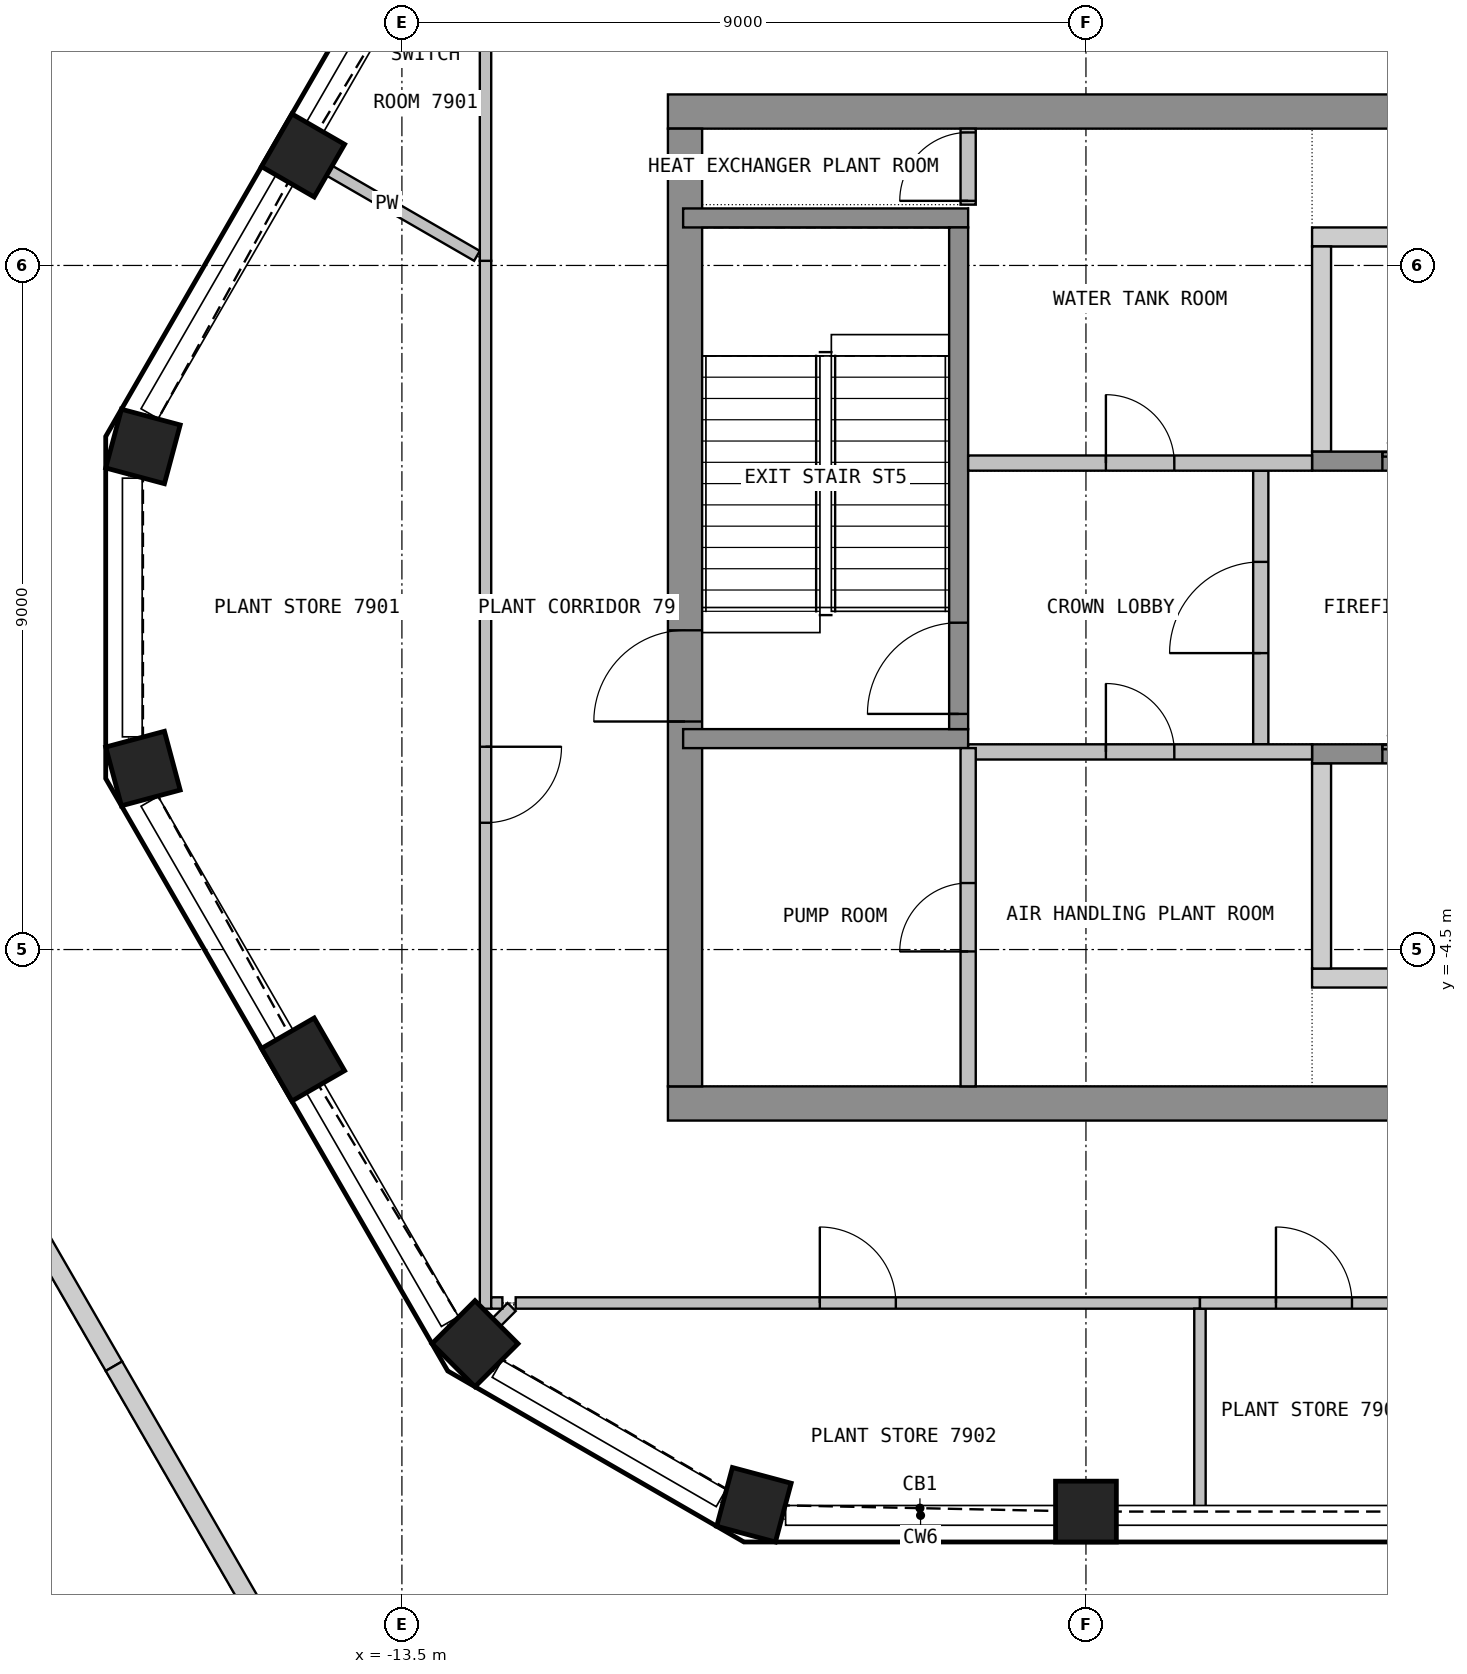
"""IFC4 building model, lengths in metres.
Left out: names, types, materials, properties, quantities, classifications, styles, units other than length and angle.
Written with IfcOpenShell. Run it as: python <this file> out.ifc"""

import sys

from ifc_helpers import new_model, si_unit, direction, frame, frame_2d, origin, origin_2d, place, context, subcontext, project, spatial, polyline, rectangle, outline, extrude, element, fill, save


model = new_model("IFC4")
c1 = context("Model", 3, precision=1e-05, world=origin(), true_north=direction((0.0, 1.0)))
c2 = subcontext(c1, "Body", "Model", "MODEL_VIEW")
j1 = project(units=[si_unit("LENGTHUNIT", "METRE"), si_unit("PLANEANGLEUNIT", "RADIAN")], contexts=[c1])
p1 = place(None, origin())
s1 = spatial("IfcSite", under=j1, at=p1, CompositionType="ELEMENT")
p2 = place(p1, origin())
s2 = spatial("IfcBuilding", under=s1, at=p2, CompositionType="ELEMENT")
p3 = place(p2, frame((0.0, 0.0, 323.4)))
s3 = spatial("IfcBuildingStorey", under=s2, at=p3, CompositionType="ELEMENT", Elevation=323.4)
for number, where, z_axis, x_axis in (
    (1, (-8.869, -11.804, 0.0), (0.0, 0.0, 1.0), (0.966, -0.259, 0.0)),
    (2, (-4.5, -11.894, 0.0), (0.0, 0.0, 1.0), (1.0, 0.0, 0.0)),
    (3, (-14.801, 5.947, 0.0), (0.0, 0.0, 1.0), (-0.5, -0.866, 0.0)),
    (4, (-16.907, 2.119, 0.0), (0.0, 0.0, 1.0), (-0.259, -0.966, 0.0)),
    (5, (-16.907, -2.119, 0.0), (0.0, 0.0, 1.0), (0.259, -0.966, 0.0)),
    (6, (-14.801, -5.947, 0.0), (0.0, 0.0, 1.0), (0.5, -0.866, 0.0)),
    (7, (-12.539, -9.686, 0.0), (0.0, 0.0, 1.0), (0.707, -0.707, 0.0)),
):
    element("IfcColumn", number, at=place(p3, frame(where, z_axis=z_axis, x_axis=x_axis)), inside=s3, PredefinedType="COLUMN", context=c2, shape_type="SweptSolid", body=[
        extrude(rectangle(XDim=0.8, YDim=0.8, at=origin_2d()), origin(), (0.0, 0.0, 1.0), 4.05),
    ])
p4 = place(p3, origin())
e8 = element("IfcWall", 8, at=p4, inside=s3, PredefinedType="PARAPET", context=c2, shape_type="SweptSolid", body=[
    extrude(outline(polyline([(-17.397, 10.044), (-19.647, 6.147), (-19.431, 6.022), (-17.181, 9.919), (-17.397, 10.044)])), origin(), (0.0, 0.0, 1.0), 1.1),
])
p5 = place(p3, origin())
e9 = element("IfcWall", 9, at=p5, inside=s3, PredefinedType="PARAPET", context=c2, shape_type="SweptSolid", body=[
    extrude(outline(polyline([(-19.647, -6.147), (-17.397, -10.044), (-17.181, -9.919), (-19.431, -6.022), (-19.647, -6.147)])), origin(), (0.0, 0.0, 1.0), 1.1),
])
p6 = place(p3, origin())
e10 = element("IfcWall", 10, at=p6, inside=s3, PredefinedType="PARAPET", context=c2, shape_type="SweptSolid", body=[
    extrude(outline(polyline([(-17.397, -10.044), (-15.147, -13.941), (-14.964, -13.758), (-17.181, -9.919), (-17.397, -10.044)])), origin(), (0.0, 0.0, 1.0), 1.1),
])
for number, where, z_axis, x_axis in (
    (11, (-10.0, 6.525, 0.0), (0.0, 0.0, 1.0), (1.0, 0.0, 0.0)),
    (12, (-10.0, -6.525, 0.0), (0.0, 0.0, 1.0), (1.0, 0.0, 0.0)),
):
    element("IfcWall", number, at=place(p3, frame(where, z_axis=z_axis, x_axis=x_axis)), inside=s3, PredefinedType="SHEAR", context=c2, shape_type="SweptSolid", body=[
        extrude(rectangle(XDim=20.0, YDim=0.45, at=frame_2d((10.0, 0.0))), origin(), (0.0, 0.0, 1.0), 4.05),
    ])
p7 = place(p3, frame((-9.775, -6.3, 0.0), z_axis=(0.0, 0.0, 1.0), x_axis=(0.0, 1.0, 0.0)))
e13 = element("IfcWall", 13, at=p7, inside=s3, PredefinedType="SHEAR", context=c2, shape_type="SweptSolid", body=[
    extrude(rectangle(XDim=12.6, YDim=0.45, at=frame_2d((6.3, 0.0))), origin(), (0.0, 0.0, 1.0), 4.05),
])
p8 = place(p7, frame((4.8, 0.0, 0.0)))
e14 = element("IfcOpeningElement", 14, at=p8, cuts=e13, PredefinedType="OPENING", context=c2, shape_type="SweptSolid", body=[
    extrude(rectangle(XDim=1.2, YDim=2.1, at=frame_2d((0.6, 1.05))), frame((0.0, 0.235, 0.0), z_axis=(0.0, -1.0, 0.0), x_axis=(1.0, 0.0, 0.0)), (0.0, 0.0, 1.0), 0.47),
])
p9 = place(p3, origin())
e15 = element("IfcWall", 15, at=p9, inside=s3, PredefinedType="SHEAR", context=c2, shape_type="SweptSolid", body=[
    extrude(outline(polyline([(-1.525, 4.75), (1.525, 4.75), (1.525, 5.0), (-1.525, 5.0), (-1.525, 4.75)])), origin(), (0.0, 0.0, 1.0), 4.05),
])
p10 = place(p3, origin())
e16 = element("IfcWall", 16, at=p10, inside=s3, PredefinedType="SHEAR", context=c2, shape_type="SweptSolid", body=[
    extrude(outline(polyline([(-1.525, 2.05), (-1.275, 2.05), (-1.275, 4.75), (-1.525, 4.75), (-1.525, 2.05)])), origin(), (0.0, 0.0, 1.0), 4.05),
])
p11 = place(p3, frame((-1.525, 1.925, 0.0), z_axis=(0.0, 0.0, 1.0), x_axis=(1.0, 0.0, 0.0)))
e17 = element("IfcWall", 17, at=p11, inside=s3, PredefinedType="SHEAR", context=c2, shape_type="SweptSolid", body=[
    extrude(rectangle(XDim=3.05, YDim=0.25, at=frame_2d((1.525, 0.0))), origin(), (0.0, 0.0, 1.0), 4.05),
])
p12 = place(p11, frame((0.925, 0.0, 0.0)))
e18 = element("IfcOpeningElement", 18, at=p12, cuts=e17, PredefinedType="OPENING", context=c2, shape_type="SweptSolid", body=[
    extrude(rectangle(XDim=1.2, YDim=2.1, at=frame_2d((0.6, 1.05))), frame((0.0, 0.135, 0.0), z_axis=(0.0, -1.0, 0.0), x_axis=(1.0, 0.0, 0.0)), (0.0, 0.0, 1.0), 0.27),
])
p13 = place(p3, origin())
e19 = element("IfcWall", 19, at=p13, inside=s3, PredefinedType="SHEAR", context=c2, shape_type="SweptSolid", body=[
    extrude(outline(polyline([(-1.525, -5.0), (1.525, -5.0), (1.525, -4.75), (-1.525, -4.75), (-1.525, -5.0)])), origin(), (0.0, 0.0, 1.0), 4.05),
])
p14 = place(p3, origin())
e20 = element("IfcWall", 20, at=p14, inside=s3, PredefinedType="SHEAR", context=c2, shape_type="SweptSolid", body=[
    extrude(outline(polyline([(-1.525, -4.75), (-1.275, -4.75), (-1.275, -2.05), (-1.525, -2.05), (-1.525, -4.75)])), origin(), (0.0, 0.0, 1.0), 4.05),
])
p15 = place(p3, frame((-1.525, -1.925, 0.0), z_axis=(0.0, 0.0, 1.0), x_axis=(1.0, 0.0, 0.0)))
e21 = element("IfcWall", 21, at=p15, inside=s3, PredefinedType="SHEAR", context=c2, shape_type="SweptSolid", body=[
    extrude(rectangle(XDim=3.05, YDim=0.25, at=frame_2d((1.525, 0.0))), origin(), (0.0, 0.0, 1.0), 4.05),
])
p16 = place(p15, frame((0.925, 0.0, 0.0)))
e22 = element("IfcOpeningElement", 22, at=p16, cuts=e21, PredefinedType="OPENING", context=c2, shape_type="SweptSolid", body=[
    extrude(rectangle(XDim=1.2, YDim=2.1, at=frame_2d((0.6, 1.05))), frame((0.0, 0.135, 0.0), z_axis=(0.0, -1.0, 0.0), x_axis=(1.0, 0.0, 0.0)), (0.0, 0.0, 1.0), 0.27),
])
p17 = place(p3, frame((-2.2, -1.8, 0.0), z_axis=(0.0, 0.0, 1.0), x_axis=(0.0, 1.0, 0.0)))
e23 = element("IfcWall", 23, at=p17, inside=s3, PredefinedType="PARTITIONING", context=c2, shape_type="SweptSolid", body=[
    extrude(rectangle(XDim=3.6, YDim=0.2, at=frame_2d((1.8, 0.0))), origin(), (0.0, 0.0, 1.0), 4.05),
])
p18 = place(p17, frame((1.2, 0.0, 0.0)))
e24 = element("IfcOpeningElement", 24, at=p18, cuts=e23, PredefinedType="OPENING", context=c2, shape_type="SweptSolid", body=[
    extrude(rectangle(XDim=1.2, YDim=2.1, at=frame_2d((0.6, 1.05))), frame((0.0, 0.11, 0.0), z_axis=(0.0, -1.0, 0.0), x_axis=(1.0, 0.0, 0.0)), (0.0, 0.0, 1.0), 0.22),
])
for number, where, z_axis, x_axis in (
    (25, (-9.8, -1.725, 0.0), (0.0, 0.0, 1.0), (1.0, 0.0, 0.0)),
    (26, (-9.8, 5.125, 0.0), (0.0, 0.0, 1.0), (1.0, 0.0, 0.0)),
):
    element("IfcWall", number, at=place(p3, frame(where, z_axis=z_axis, x_axis=x_axis)), inside=s3, PredefinedType="SHEAR", context=c2, shape_type="SweptSolid", body=[
        extrude(rectangle(XDim=3.75, YDim=0.25, at=frame_2d((1.875, 0.0))), origin(), (0.0, 0.0, 1.0), 4.05),
    ])
p19 = place(p3, frame((-6.175, -1.6, 0.0), z_axis=(0.0, 0.0, 1.0), x_axis=(0.0, 1.0, 0.0)))
e27 = element("IfcWall", 27, at=p19, inside=s3, PredefinedType="SHEAR", context=c2, shape_type="SweptSolid", body=[
    extrude(rectangle(XDim=6.6, YDim=0.25, at=frame_2d((3.3, 0.0))), origin(), (0.0, 0.0, 1.0), 4.05),
])
p20 = place(p19, frame((0.2, 0.0, 0.0)))
e28 = element("IfcOpeningElement", 28, at=p20, cuts=e27, PredefinedType="OPENING", context=c2, shape_type="SweptSolid", body=[
    extrude(rectangle(XDim=1.2, YDim=2.1, at=frame_2d((0.6, 1.05))), frame((0.0, 0.135, 0.0), z_axis=(0.0, -1.0, 0.0), x_axis=(1.0, 0.0, 0.0)), (0.0, 0.0, 1.0), 0.27),
])
p21 = place(p3, frame((-6.05, 1.9, 0.0), z_axis=(0.0, 0.0, 1.0), x_axis=(1.0, 0.0, 0.0)))
e29 = element("IfcWall", 29, at=p21, inside=s3, PredefinedType="PARTITIONING", context=c2, shape_type="SweptSolid", body=[
    extrude(rectangle(XDim=4.525, YDim=0.2, at=frame_2d((2.263, 0.0))), origin(), (0.0, 0.0, 1.0), 4.05),
])
p22 = place(p21, frame((1.812, 0.0, 0.0)))
e30 = element("IfcOpeningElement", 30, at=p22, cuts=e29, PredefinedType="OPENING", context=c2, shape_type="SweptSolid", body=[
    extrude(rectangle(XDim=0.9, YDim=2.1, at=frame_2d((0.45, 1.05))), frame((0.0, 0.11, 0.0), z_axis=(0.0, -1.0, 0.0), x_axis=(1.0, 0.0, 0.0)), (0.0, 0.0, 1.0), 0.22),
])
p23 = place(p3, frame((-6.05, -1.9, 0.0), z_axis=(0.0, 0.0, 1.0), x_axis=(1.0, 0.0, 0.0)))
e31 = element("IfcWall", 31, at=p23, inside=s3, PredefinedType="PARTITIONING", context=c2, shape_type="SweptSolid", body=[
    extrude(rectangle(XDim=4.525, YDim=0.2, at=frame_2d((2.263, 0.0))), origin(), (0.0, 0.0, 1.0), 4.05),
])
p24 = place(p23, frame((1.812, 0.0, 0.0)))
e32 = element("IfcOpeningElement", 32, at=p24, cuts=e31, PredefinedType="OPENING", context=c2, shape_type="SweptSolid", body=[
    extrude(rectangle(XDim=0.9, YDim=2.1, at=frame_2d((0.45, 1.05))), frame((0.0, 0.11, 0.0), z_axis=(0.0, -1.0, 0.0), x_axis=(1.0, 0.0, 0.0)), (0.0, 0.0, 1.0), 0.22),
])
p25 = place(p3, frame((-6.05, 5.3, 0.0), z_axis=(0.0, 0.0, 1.0), x_axis=(0.0, 1.0, 0.0)))
e33 = element("IfcWall", 33, at=p25, inside=s3, PredefinedType="PARTITIONING", context=c2, shape_type="SweptSolid", body=[
    extrude(rectangle(XDim=1.0, YDim=0.2, at=frame_2d((0.5, 0.0))), origin(), (0.0, 0.0, 1.0), 4.05),
])
p26 = place(p25, frame((0.05, 0.0, 0.0)))
e34 = element("IfcOpeningElement", 34, at=p26, cuts=e33, PredefinedType="OPENING", context=c2, shape_type="SweptSolid", body=[
    extrude(rectangle(XDim=0.9, YDim=2.1, at=frame_2d((0.45, 1.05))), frame((0.0, 0.11, 0.0), z_axis=(0.0, -1.0, 0.0), x_axis=(1.0, 0.0, 0.0)), (0.0, 0.0, 1.0), 0.22),
])
p27 = place(p3, frame((-6.05, -6.3, 0.0), z_axis=(0.0, 0.0, 1.0), x_axis=(0.0, 1.0, 0.0)))
e35 = element("IfcWall", 35, at=p27, inside=s3, PredefinedType="PARTITIONING", context=c2, shape_type="SweptSolid", body=[
    extrude(rectangle(XDim=4.45, YDim=0.2, at=frame_2d((2.225, 0.0))), origin(), (0.0, 0.0, 1.0), 4.05),
])
p28 = place(p27, frame((1.775, 0.0, 0.0)))
e36 = element("IfcOpeningElement", 36, at=p28, cuts=e35, PredefinedType="OPENING", context=c2, shape_type="SweptSolid", body=[
    extrude(rectangle(XDim=0.9, YDim=2.1, at=frame_2d((0.45, 1.05))), frame((0.0, 0.11, 0.0), z_axis=(0.0, -1.0, 0.0), x_axis=(1.0, 0.0, 0.0)), (0.0, 0.0, 1.0), 0.22),
])
p29 = place(p3, frame((-14.887, 5.997, 0.0), z_axis=(0.0, 0.0, 1.0), x_axis=(0.865976483427, -0.500084722974, 0.0)))
e37 = element("IfcWall", 37, at=p29, inside=s3, PredefinedType="PARTITIONING", context=c2, shape_type="SweptSolid", body=[
    extrude(rectangle(XDim=2.742, YDim=0.15, at=frame_2d((1.371, 0.0))), origin(), (0.0, 0.0, 1.0), 4.05),
])
p30 = place(p3, frame((-12.056, -9.203, 0.0), z_axis=(0.0, 0.0, 1.0), x_axis=(-0.706689978005, -0.707523338828, 0.0)))
e38 = element("IfcWall", 38, at=p30, inside=s3, PredefinedType="PARTITIONING", context=c2, shape_type="SweptSolid", body=[
    extrude(rectangle(XDim=0.879, YDim=0.15, at=frame_2d((0.439, 0.0))), origin(), (0.0, 0.0, 1.0), 4.05),
])
p31 = place(p3, frame((-12.4, 4.561, 0.0), z_axis=(0.0, 0.0, 1.0), x_axis=(0.0, -1.0, 0.0)))
e39 = element("IfcWall", 39, at=p31, inside=s3, PredefinedType="PARTITIONING", context=c2, shape_type="SweptSolid", body=[
    extrude(rectangle(XDim=13.786, YDim=0.15, at=frame_2d((6.893, 0.0))), origin(), (0.0, 0.0, 1.0), 4.05),
])
p32 = place(p31, frame((6.393, 0.0, 0.0)))
e40 = element("IfcOpeningElement", 40, at=p32, cuts=e39, PredefinedType="OPENING", context=c2, shape_type="SweptSolid", body=[
    extrude(rectangle(XDim=1.0, YDim=2.1, at=frame_2d((0.5, 1.05))), frame((0.0, 0.085, 0.0), z_axis=(0.0, -1.0, 0.0), x_axis=(1.0, 0.0, 0.0)), (0.0, 0.0, 1.0), 0.17),
])
p33 = place(p3, frame((-12.325, -9.15, 0.0), z_axis=(0.0, 0.0, 1.0), x_axis=(1.0, 0.0, 0.0)))
e41 = element("IfcWall", 41, at=p33, inside=s3, PredefinedType="PARTITIONING", context=c2, shape_type="SweptSolid", body=[
    extrude(rectangle(XDim=0.147, YDim=0.15, at=frame_2d((0.073, 0.0))), origin(), (0.0, 0.0, 1.0), 4.05),
])
p34 = place(p3, frame((-12.4, 9.225, 0.0), z_axis=(0.0, 0.0, 1.0), x_axis=(0.0, -1.0, 0.0)))
e42 = element("IfcWall", 42, at=p34, inside=s3, PredefinedType="PARTITIONING", context=c2, shape_type="SweptSolid", body=[
    extrude(rectangle(XDim=4.664, YDim=0.15, at=frame_2d((2.332, 0.0))), origin(), (0.0, 0.0, 1.0), 4.05),
])
p35 = place(p3, frame((-12.003, -9.15, 0.0), z_axis=(0.0, 0.0, 1.0), x_axis=(1.0, 0.0, 0.0)))
e43 = element("IfcWall", 43, at=p35, inside=s3, PredefinedType="PARTITIONING", context=c2, shape_type="SweptSolid", body=[
    extrude(rectangle(XDim=9.003, YDim=0.15, at=frame_2d((4.501, 0.0))), origin(), (0.0, 0.0, 1.0), 4.05),
])
p36 = place(p35, frame((4.001, 0.0, 0.0)))
e44 = element("IfcOpeningElement", 44, at=p36, cuts=e43, PredefinedType="OPENING", context=c2, shape_type="SweptSolid", body=[
    extrude(rectangle(XDim=1.0, YDim=2.1, at=frame_2d((0.5, 1.05))), frame((0.0, 0.085, 0.0), z_axis=(0.0, -1.0, 0.0), x_axis=(1.0, 0.0, 0.0)), (0.0, 0.0, 1.0), 0.17),
])
p37 = place(p3, frame((-3.0, -9.225, 0.0), z_axis=(0.0, 0.0, 1.0), x_axis=(0.0, -1.0, 0.0)))
e45 = element("IfcWall", 45, at=p37, inside=s3, PredefinedType="PARTITIONING", context=c2, shape_type="SweptSolid", body=[
    extrude(rectangle(XDim=2.769, YDim=0.15, at=frame_2d((1.384, 0.0))), origin(), (0.0, 0.0, 1.0), 4.05),
])
p38 = place(p3, frame((-3.0, -9.15, 0.0), z_axis=(0.0, 0.0, 1.0), x_axis=(1.0, 0.0, 0.0)))
e46 = element("IfcWall", 46, at=p38, inside=s3, PredefinedType="PARTITIONING", context=c2, shape_type="SweptSolid", body=[
    extrude(rectangle(XDim=3.0, YDim=0.15, at=frame_2d((1.5, 0.0))), origin(), (0.0, 0.0, 1.0), 4.05),
])
p39 = place(p38, frame((1.0, 0.0, 0.0)))
e47 = element("IfcOpeningElement", 47, at=p39, cuts=e46, PredefinedType="OPENING", context=c2, shape_type="SweptSolid", body=[
    extrude(rectangle(XDim=1.0, YDim=2.1, at=frame_2d((0.5, 1.05))), frame((0.0, 0.085, 0.0), z_axis=(0.0, -1.0, 0.0), x_axis=(1.0, 0.0, 0.0)), (0.0, 0.0, 1.0), 0.17),
])
p40 = place(p8, origin())
e48 = element("IfcDoor", 48, at=p40, inside=s3, OperationType="SINGLE_SWING_RIGHT", PredefinedType="DOOR", context=c2, shape_type="SweptSolid", body=[
    extrude(rectangle(XDim=1.2, YDim=2.1, at=frame_2d((0.6, 1.05))), frame((0.0, 0.025, 0.0), z_axis=(0.0, -1.0, 0.0), x_axis=(1.0, 0.0, 0.0)), (0.0, 0.0, 1.0), 0.05),
])
fill(e14, e48)
p41 = place(p12, origin())
e49 = element("IfcDoor", 49, at=p41, inside=s3, OperationType="DOUBLE_DOOR_SLIDING", PredefinedType="DOOR", context=c2, shape_type="SweptSolid", body=[
    extrude(rectangle(XDim=1.2, YDim=2.1, at=frame_2d((0.6, 1.05))), frame((0.0, 0.025, 0.0), z_axis=(0.0, -1.0, 0.0), x_axis=(1.0, 0.0, 0.0)), (0.0, 0.0, 1.0), 0.05),
])
fill(e18, e49)
p42 = place(p16, origin())
e50 = element("IfcDoor", 50, at=p42, inside=s3, OperationType="DOUBLE_DOOR_SLIDING", PredefinedType="DOOR", context=c2, shape_type="SweptSolid", body=[
    extrude(rectangle(XDim=1.2, YDim=2.1, at=frame_2d((0.6, 1.05))), frame((0.0, 0.025, 0.0), z_axis=(0.0, -1.0, 0.0), x_axis=(1.0, 0.0, 0.0)), (0.0, 0.0, 1.0), 0.05),
])
fill(e22, e50)
p43 = place(p18, origin())
e51 = element("IfcDoor", 51, at=p43, inside=s3, OperationType="SINGLE_SWING_LEFT", PredefinedType="DOOR", context=c2, shape_type="SweptSolid", body=[
    extrude(rectangle(XDim=1.2, YDim=2.1, at=frame_2d((0.6, 1.05))), frame((0.0, 0.025, 0.0), z_axis=(0.0, -1.0, 0.0), x_axis=(1.0, 0.0, 0.0)), (0.0, 0.0, 1.0), 0.05),
])
fill(e24, e51)
p44 = place(p20, origin())
e52 = element("IfcDoor", 52, at=p44, inside=s3, OperationType="SINGLE_SWING_LEFT", PredefinedType="DOOR", context=c2, shape_type="SweptSolid", body=[
    extrude(rectangle(XDim=1.2, YDim=2.1, at=frame_2d((0.6, 1.05))), frame((0.0, 0.025, 0.0), z_axis=(0.0, -1.0, 0.0), x_axis=(1.0, 0.0, 0.0)), (0.0, 0.0, 1.0), 0.05),
])
fill(e28, e52)
p45 = place(p22, origin())
e53 = element("IfcDoor", 53, at=p45, inside=s3, OperationType="SINGLE_SWING_LEFT", PredefinedType="DOOR", context=c2, shape_type="SweptSolid", body=[
    extrude(rectangle(XDim=0.9, YDim=2.1, at=frame_2d((0.45, 1.05))), frame((0.0, 0.025, 0.0), z_axis=(0.0, -1.0, 0.0), x_axis=(1.0, 0.0, 0.0)), (0.0, 0.0, 1.0), 0.05),
])
fill(e30, e53)
p46 = place(p24, origin())
e54 = element("IfcDoor", 54, at=p46, inside=s3, OperationType="SINGLE_SWING_LEFT", PredefinedType="DOOR", context=c2, shape_type="SweptSolid", body=[
    extrude(rectangle(XDim=0.9, YDim=2.1, at=frame_2d((0.45, 1.05))), frame((0.0, 0.025, 0.0), z_axis=(0.0, -1.0, 0.0), x_axis=(1.0, 0.0, 0.0)), (0.0, 0.0, 1.0), 0.05),
])
fill(e32, e54)
p47 = place(p26, origin())
e55 = element("IfcDoor", 55, at=p47, inside=s3, OperationType="SINGLE_SWING_LEFT", PredefinedType="DOOR", context=c2, shape_type="SweptSolid", body=[
    extrude(rectangle(XDim=0.9, YDim=2.1, at=frame_2d((0.45, 1.05))), frame((0.0, 0.025, 0.0), z_axis=(0.0, -1.0, 0.0), x_axis=(1.0, 0.0, 0.0)), (0.0, 0.0, 1.0), 0.05),
])
fill(e34, e55)
p48 = place(p28, origin())
e56 = element("IfcDoor", 56, at=p48, inside=s3, OperationType="SINGLE_SWING_LEFT", PredefinedType="DOOR", context=c2, shape_type="SweptSolid", body=[
    extrude(rectangle(XDim=0.9, YDim=2.1, at=frame_2d((0.45, 1.05))), frame((0.0, 0.025, 0.0), z_axis=(0.0, -1.0, 0.0), x_axis=(1.0, 0.0, 0.0)), (0.0, 0.0, 1.0), 0.05),
])
fill(e36, e56)
p49 = place(p32, origin())
e57 = element("IfcDoor", 57, at=p49, inside=s3, OperationType="SINGLE_SWING_RIGHT", PredefinedType="DOOR", context=c2, shape_type="SweptSolid", body=[
    extrude(rectangle(XDim=1.0, YDim=2.1, at=frame_2d((0.5, 1.05))), frame((0.0, 0.025, 0.0), z_axis=(0.0, -1.0, 0.0), x_axis=(1.0, 0.0, 0.0)), (0.0, 0.0, 1.0), 0.05),
])
fill(e40, e57)
p50 = place(p36, origin())
e58 = element("IfcDoor", 58, at=p50, inside=s3, OperationType="SINGLE_SWING_LEFT", PredefinedType="DOOR", context=c2, shape_type="SweptSolid", body=[
    extrude(rectangle(XDim=1.0, YDim=2.1, at=frame_2d((0.5, 1.05))), frame((0.0, 0.025, 0.0), z_axis=(0.0, -1.0, 0.0), x_axis=(1.0, 0.0, 0.0)), (0.0, 0.0, 1.0), 0.05),
])
fill(e44, e58)
p51 = place(p39, origin())
e59 = element("IfcDoor", 59, at=p51, inside=s3, OperationType="SINGLE_SWING_RIGHT", PredefinedType="DOOR", context=c2, shape_type="SweptSolid", body=[
    extrude(rectangle(XDim=1.0, YDim=2.1, at=frame_2d((0.5, 1.05))), frame((0.0, 0.025, 0.0), z_axis=(0.0, -1.0, 0.0), x_axis=(1.0, 0.0, 0.0)), (0.0, 0.0, 1.0), 0.05),
])
fill(e47, e59)
save(model, sys.argv[1])
